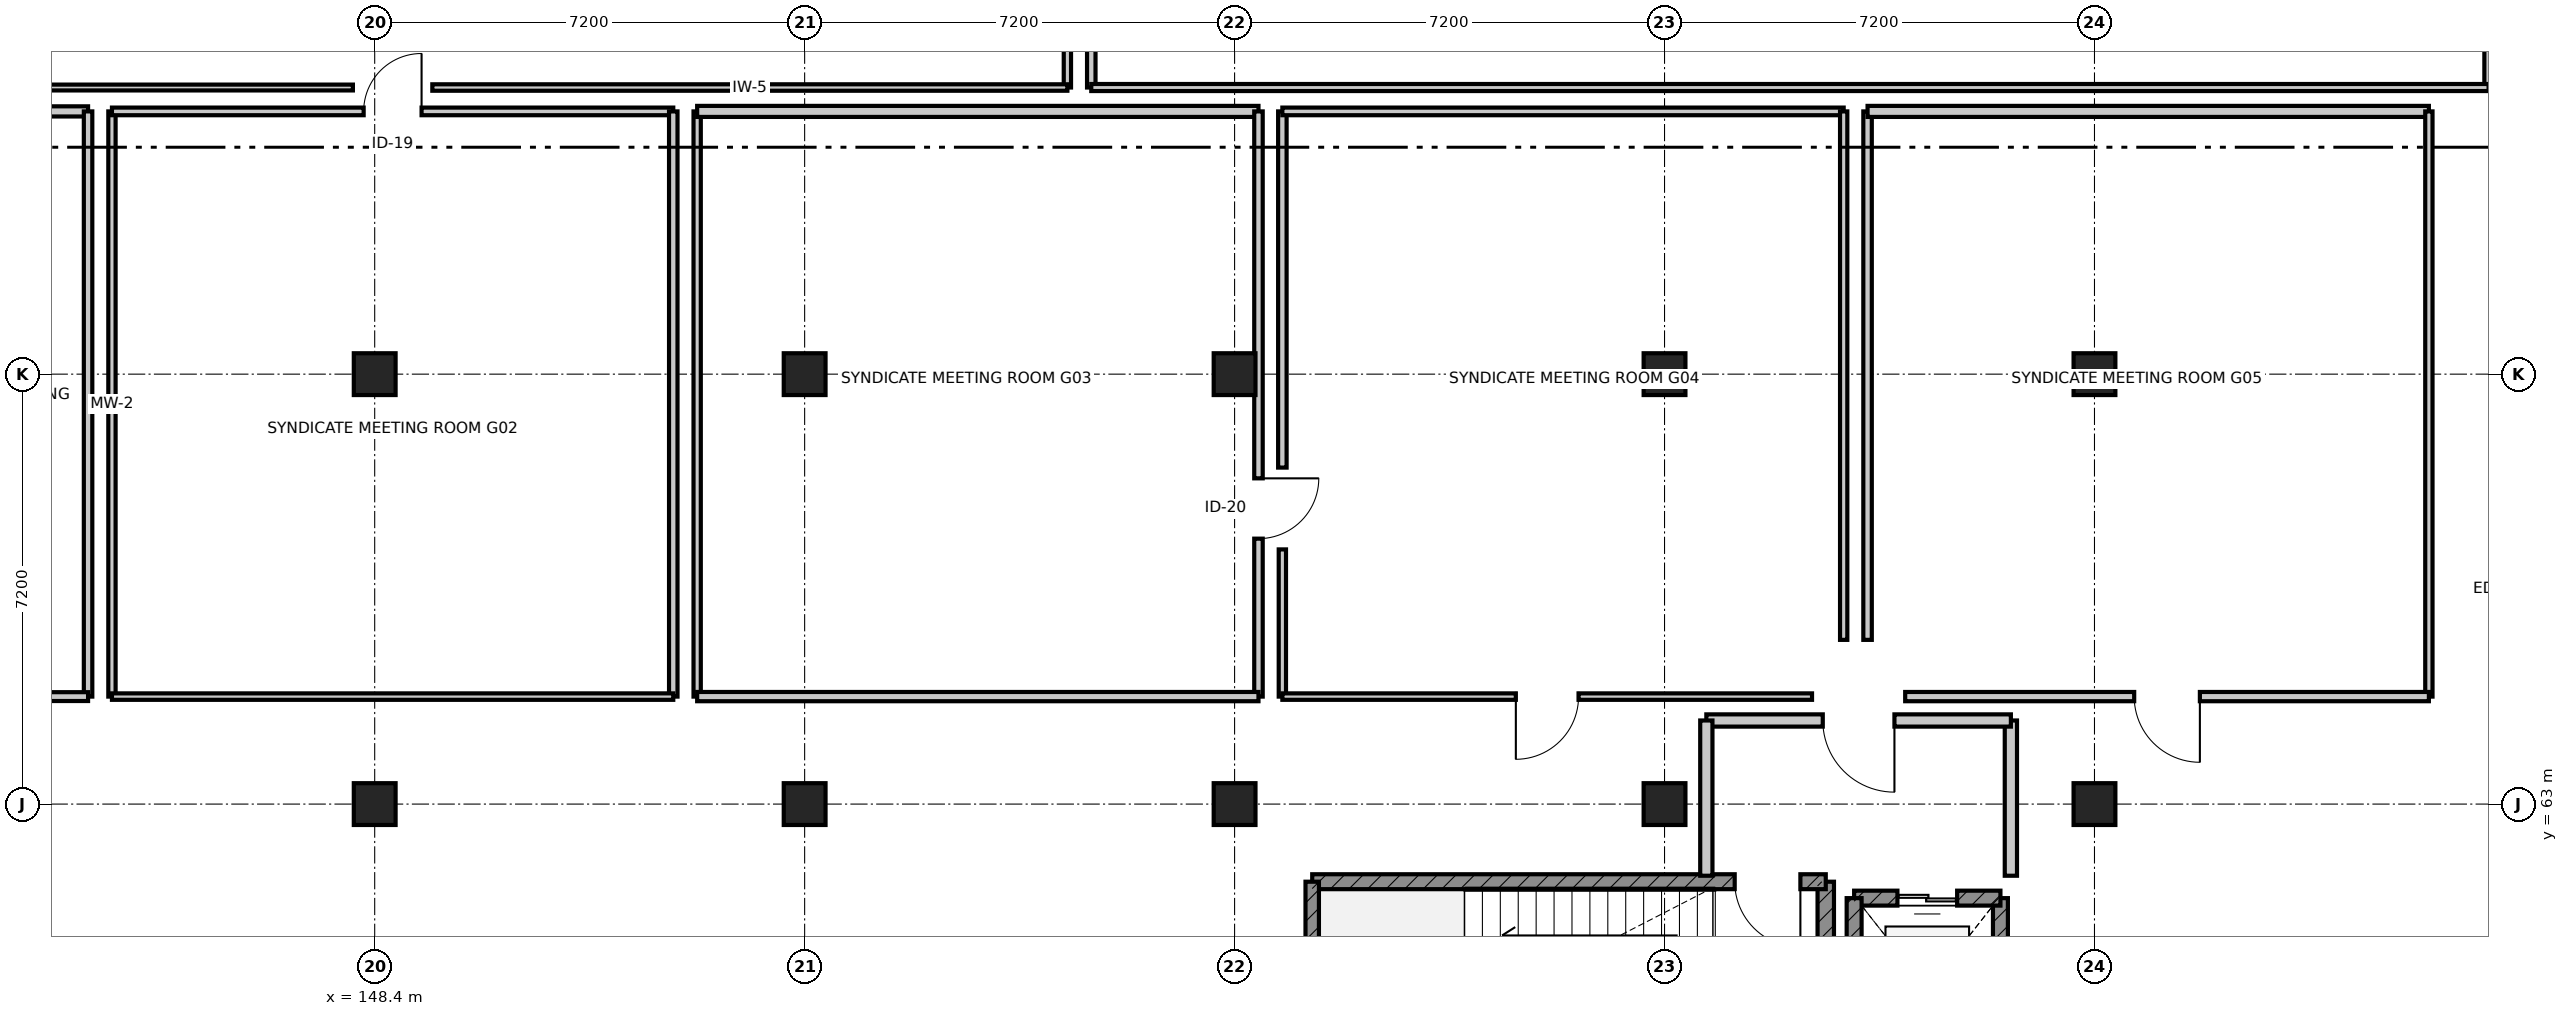
"""IFC4 building model, lengths in metres.
Left out: names, types, materials, properties, quantities, classifications, styles, units other than length and angle.
Written with IfcOpenShell. Run it as: python <this file> out.ifc"""

import sys

from ifc_helpers import new_model, si_unit, direction, frame, frame_2d, origin, origin_2d, place, context, subcontext, project, spatial, rectangle, extrude, element, fill, save


model = new_model("IFC4")
c1 = context("Model", 3, precision=1e-05, world=origin(), true_north=direction((0.0, 1.0)))
c2 = subcontext(c1, "Body", "Model", "MODEL_VIEW")
j1 = project(units=[si_unit("LENGTHUNIT", "METRE"), si_unit("PLANEANGLEUNIT", "RADIAN")], contexts=[c1])
p1 = place(None, origin())
s1 = spatial("IfcSite", under=j1, at=p1, CompositionType="ELEMENT")
p2 = place(p1, origin())
s2 = spatial("IfcBuilding", under=s1, at=p2, CompositionType="ELEMENT")
p3 = place(p2, origin())
s3 = spatial("IfcBuildingStorey", under=s2, at=p3, CompositionType="ELEMENT", Elevation=0.0)
for number, where, z_axis, x_axis in (
    (1, (148.4, 63.0, 0.0), (0.0, 0.0, 1.0), (1.0, 0.0, 0.0)),
    (2, (148.4, 70.2, 0.0), (0.0, 0.0, 1.0), (1.0, 0.0, 0.0)),
    (3, (155.6, 63.0, 0.0), (0.0, 0.0, 1.0), (1.0, 0.0, 0.0)),
    (4, (155.6, 70.2, 0.0), (0.0, 0.0, 1.0), (1.0, 0.0, 0.0)),
    (5, (162.8, 63.0, 0.0), (0.0, 0.0, 1.0), (1.0, 0.0, 0.0)),
    (6, (162.8, 70.2, 0.0), (0.0, 0.0, 1.0), (1.0, 0.0, 0.0)),
    (7, (170.0, 63.0, 0.0), (0.0, 0.0, 1.0), (1.0, 0.0, 0.0)),
    (8, (170.0, 70.2, 0.0), (0.0, 0.0, 1.0), (1.0, 0.0, 0.0)),
    (9, (177.2, 63.0, 0.0), (0.0, 0.0, 1.0), (1.0, 0.0, 0.0)),
    (10, (177.2, 70.2, 0.0), (0.0, 0.0, 1.0), (1.0, 0.0, 0.0)),
):
    element("IfcColumn", number, at=place(p3, frame(where, z_axis=z_axis, x_axis=x_axis)), inside=s3, PredefinedType="COLUMN", context=c2, shape_type="SweptSolid", body=[
        extrude(rectangle(XDim=0.7, YDim=0.7, at=origin_2d()), origin(), (0.0, 0.0, 1.0), 5.4),
    ])
p4 = place(p3, frame((172.7, 58.1, 0.0), z_axis=(0.0, 0.0, 1.0), x_axis=(0.0, 1.0, 0.0)))
e11 = element("IfcWall", 11, at=p4, inside=s3, PredefinedType="SHEAR", context=c2, shape_type="SweptSolid", body=[
    extrude(rectangle(XDim=3.6, YDim=0.275, at=frame_2d((1.8, 0.0))), origin(), (0.0, 0.0, 1.0), 5.1),
])
p5 = place(p3, frame((172.7, 61.7, 0.0), z_axis=(0.0, 0.0, 1.0), x_axis=(-1.0, 0.0, 0.0)))
e12 = element("IfcWall", 12, at=p5, inside=s3, PredefinedType="SHEAR", context=c2, shape_type="SweptSolid", body=[
    extrude(rectangle(XDim=8.6, YDim=0.25, at=frame_2d((4.3, 0.0))), origin(), (0.0, 0.0, 1.0), 5.1),
])
p6 = place(p5, frame((0.425, 0.0, 0.0)))
e13 = element("IfcOpeningElement", 13, at=p6, cuts=e12, PredefinedType="OPENING", context=c2, shape_type="SweptSolid", body=[
    extrude(rectangle(XDim=1.1, YDim=2.1, at=frame_2d((0.55, 1.05))), frame((0.0, 0.135, 0.0), z_axis=(0.0, -1.0, 0.0), x_axis=(1.0, 0.0, 0.0)), (0.0, 0.0, 1.0), 0.27),
])
p7 = place(p3, frame((164.1, 61.7, 0.0), z_axis=(0.0, 0.0, 1.0), x_axis=(0.0, -1.0, 0.0)))
e14 = element("IfcWall", 14, at=p7, inside=s3, PredefinedType="SHEAR", context=c2, shape_type="SweptSolid", body=[
    extrude(rectangle(XDim=3.6, YDim=0.225, at=frame_2d((1.8, 0.0))), origin(), (0.0, 0.0, 1.0), 5.1),
])
p8 = place(p3, frame((175.625, 58.375, 0.0), z_axis=(0.0, 0.0, 1.0), x_axis=(0.0, 1.0, 0.0)))
e15 = element("IfcWall", 15, at=p8, inside=s3, PredefinedType="SHEAR", context=c2, shape_type="SweptSolid", body=[
    extrude(rectangle(XDim=3.05, YDim=0.25, at=frame_2d((1.525, 0.0))), origin(), (0.0, 0.0, 1.0), 5.1),
])
p9 = place(p3, frame((175.625, 61.425, 0.0), z_axis=(0.0, 0.0, 1.0), x_axis=(-1.0, 0.0, 0.0)))
e16 = element("IfcWall", 16, at=p9, inside=s3, PredefinedType="SHEAR", context=c2, shape_type="SweptSolid", body=[
    extrude(rectangle(XDim=2.45, YDim=0.25, at=frame_2d((1.225, 0.0))), origin(), (0.0, 0.0, 1.0), 5.1),
])
p10 = place(p9, frame((0.725, 0.0, 0.0)))
e17 = element("IfcOpeningElement", 17, at=p10, cuts=e16, PredefinedType="OPENING", context=c2, shape_type="SweptSolid", body=[
    extrude(rectangle(XDim=1.0, YDim=2.15, at=frame_2d((0.5, 1.075))), frame((0.0, 0.135, 0.0), z_axis=(0.0, -1.0, 0.0), x_axis=(1.0, 0.0, 0.0)), (0.0, 0.0, 1.0), 0.27),
])
p11 = place(p3, frame((173.175, 61.425, 0.0), z_axis=(0.0, 0.0, 1.0), x_axis=(0.0, -1.0, 0.0)))
e18 = element("IfcWall", 18, at=p11, inside=s3, PredefinedType="SHEAR", context=c2, shape_type="SweptSolid", body=[
    extrude(rectangle(XDim=3.05, YDim=0.25, at=frame_2d((1.525, 0.0))), origin(), (0.0, 0.0, 1.0), 5.1),
])
p12 = place(p3, frame((175.8, 61.8, 0.0), z_axis=(0.0, 0.0, 1.0), x_axis=(0.0, 1.0, 0.0)))
e19 = element("IfcWall", 19, at=p12, inside=s3, PredefinedType="PARTITIONING", context=c2, shape_type="SweptSolid", body=[
    extrude(rectangle(XDim=2.6, YDim=0.205, at=frame_2d((1.3, 0.0))), origin(), (0.0, 0.0, 1.0), 4.435),
])
p13 = place(p3, frame((175.8, 64.4, 0.0), z_axis=(0.0, 0.0, 1.0), x_axis=(-1.0, 0.0, 0.0)))
e20 = element("IfcWall", 20, at=p13, inside=s3, PredefinedType="PARTITIONING", context=c2, shape_type="SweptSolid", body=[
    extrude(rectangle(XDim=5.1, YDim=0.205, at=frame_2d((2.55, 0.0))), origin(), (0.0, 0.0, 1.0), 5.1),
])
p14 = place(p13, frame((1.95, 0.0, 0.0)))
e21 = element("IfcOpeningElement", 21, at=p14, cuts=e20, PredefinedType="OPENING", context=c2, shape_type="SweptSolid", body=[
    extrude(rectangle(XDim=1.2, YDim=2.1, at=frame_2d((0.6, 1.05))), frame((0.0, 0.113, 0.0), z_axis=(0.0, -1.0, 0.0), x_axis=(1.0, 0.0, 0.0)), (0.0, 0.0, 1.0), 0.225),
])
p15 = place(p3, frame((170.7, 64.4, 0.0), z_axis=(0.0, 0.0, 1.0), x_axis=(0.0, -1.0, 0.0)))
e22 = element("IfcWall", 22, at=p15, inside=s3, PredefinedType="PARTITIONING", context=c2, shape_type="SweptSolid", body=[
    extrude(rectangle(XDim=2.6, YDim=0.205, at=frame_2d((1.3, 0.0))), origin(), (0.0, 0.0, 1.0), 4.435),
])
p16 = place(p3, frame((134.2, 74.6, 0.0), z_axis=(0.0, 0.0, 1.0), x_axis=(1.0, 0.0, 0.0)))
e23 = element("IfcWall", 23, at=p16, inside=s3, PredefinedType="PARTITIONING", context=c2, shape_type="SweptSolid", body=[
    extrude(rectangle(XDim=9.4, YDim=0.17, at=frame_2d((4.7, 0.0))), origin(), (0.0, 0.0, 1.0), 4.548),
])
p17 = place(p3, frame((143.6, 74.6, 0.0), z_axis=(0.0, 0.0, 1.0), x_axis=(0.0, -1.0, 0.0)))
e24 = element("IfcWall", 24, at=p17, inside=s3, PredefinedType="MOVABLE", context=c2, shape_type="SweptSolid", body=[
    extrude(rectangle(XDim=9.8, YDim=0.142, at=frame_2d((4.9, 0.0))), origin(), (0.0, 0.0, 1.0), 4.435),
])
p18 = place(p3, frame((143.6, 64.8, 0.0), z_axis=(0.0, 0.0, 1.0), x_axis=(-1.0, 0.0, 0.0)))
e25 = element("IfcWall", 25, at=p18, inside=s3, PredefinedType="PARTITIONING", context=c2, shape_type="SweptSolid", body=[
    extrude(rectangle(XDim=9.4, YDim=0.148, at=frame_2d((4.7, 0.0))), origin(), (0.0, 0.0, 1.0), 4.548),
])
p19 = place(p3, frame((144.0, 64.8, 0.0), z_axis=(0.0, 0.0, 1.0), x_axis=(0.0, 1.0, 0.0)))
e26 = element("IfcWall", 26, at=p19, inside=s3, PredefinedType="MOVABLE", context=c2, shape_type="SweptSolid", body=[
    extrude(rectangle(XDim=9.8, YDim=0.122, at=frame_2d((4.9, 0.0))), origin(), (0.0, 0.0, 1.0), 4.435),
])
p20 = place(p3, frame((144.0, 74.6, 0.0), z_axis=(0.0, 0.0, 1.0), x_axis=(1.0, 0.0, 0.0)))
e27 = element("IfcWall", 27, at=p20, inside=s3, PredefinedType="PARTITIONING", context=c2, shape_type="SweptSolid", body=[
    extrude(rectangle(XDim=9.4, YDim=0.128, at=frame_2d((4.7, 0.0))), origin(), (0.0, 0.0, 1.0), 4.548),
])
p21 = place(p20, frame((4.215, 0.0, 0.0)))
e28 = element("IfcOpeningElement", 28, at=p21, cuts=e27, PredefinedType="OPENING", context=c2, shape_type="SweptSolid", body=[
    extrude(rectangle(XDim=0.97, YDim=2.16, at=frame_2d((0.485, 1.08))), frame((0.0, 0.074, 0.0), z_axis=(0.0, -1.0, 0.0), x_axis=(1.0, 0.0, 0.0)), (0.0, 0.0, 1.0), 0.148),
])
p22 = place(p3, frame((153.4, 74.6, 0.0), z_axis=(0.0, 0.0, 1.0), x_axis=(0.0, -1.0, 0.0)))
e29 = element("IfcWall", 29, at=p22, inside=s3, PredefinedType="MOVABLE", context=c2, shape_type="SweptSolid", body=[
    extrude(rectangle(XDim=9.8, YDim=0.142, at=frame_2d((4.9, 0.0))), origin(), (0.0, 0.0, 1.0), 4.435),
])
p23 = place(p3, frame((153.4, 64.8, 0.0), z_axis=(0.0, 0.0, 1.0), x_axis=(-1.0, 0.0, 0.0)))
e30 = element("IfcWall", 30, at=p23, inside=s3, PredefinedType="PARTITIONING", context=c2, shape_type="SweptSolid", body=[
    extrude(rectangle(XDim=9.4, YDim=0.108, at=frame_2d((4.7, 0.0))), origin(), (0.0, 0.0, 1.0), 4.548),
])
p24 = place(p3, frame((153.8, 64.8, 0.0), z_axis=(0.0, 0.0, 1.0), x_axis=(0.0, 1.0, 0.0)))
e31 = element("IfcWall", 31, at=p24, inside=s3, PredefinedType="MOVABLE", context=c2, shape_type="SweptSolid", body=[
    extrude(rectangle(XDim=9.8, YDim=0.122, at=frame_2d((4.9, 0.0))), origin(), (0.0, 0.0, 1.0), 4.435),
])
p25 = place(p3, frame((153.8, 74.6, 0.0), z_axis=(0.0, 0.0, 1.0), x_axis=(1.0, 0.0, 0.0)))
e32 = element("IfcWall", 32, at=p25, inside=s3, PredefinedType="PARTITIONING", context=c2, shape_type="SweptSolid", body=[
    extrude(rectangle(XDim=9.4, YDim=0.185, at=frame_2d((4.7, 0.0))), origin(), (0.0, 0.0, 1.0), 4.548),
])
p26 = place(p3, frame((163.2, 74.6, 0.0), z_axis=(0.0, 0.0, 1.0), x_axis=(0.0, -1.0, 0.0)))
e33 = element("IfcWall", 33, at=p26, inside=s3, PredefinedType="MOVABLE", context=c2, shape_type="SweptSolid", body=[
    extrude(rectangle(XDim=9.8, YDim=0.142, at=frame_2d((4.9, 0.0))), origin(), (0.0, 0.0, 1.0), 4.435),
])
p27 = place(p26, frame((6.145, 0.0, 0.0)))
e34 = element("IfcOpeningElement", 34, at=p27, cuts=e33, PredefinedType="OPENING", context=c2, shape_type="SweptSolid", body=[
    extrude(rectangle(XDim=1.01, YDim=2.16, at=frame_2d((0.505, 1.08))), frame((0.0, 0.081, 0.0), z_axis=(0.0, -1.0, 0.0), x_axis=(1.0, 0.0, 0.0)), (0.0, 0.0, 1.0), 0.162),
])
p28 = place(p3, frame((163.2, 64.8, 0.0), z_axis=(0.0, 0.0, 1.0), x_axis=(-1.0, 0.0, 0.0)))
e35 = element("IfcWall", 35, at=p28, inside=s3, PredefinedType="PARTITIONING", context=c2, shape_type="SweptSolid", body=[
    extrude(rectangle(XDim=9.4, YDim=0.155, at=frame_2d((4.7, 0.0))), origin(), (0.0, 0.0, 1.0), 4.548),
])
p29 = place(p3, frame((163.6, 64.8, 0.0), z_axis=(0.0, 0.0, 1.0), x_axis=(0.0, 1.0, 0.0)))
e36 = element("IfcWall", 36, at=p29, inside=s3, PredefinedType="MOVABLE", context=c2, shape_type="SweptSolid", body=[
    extrude(rectangle(XDim=2.465, YDim=0.122, at=frame_2d((1.232, 0.0))), origin(), (0.0, 0.0, 1.0), 4.727),
])
p30 = place(p3, frame((163.6, 68.635, 0.0), z_axis=(0.0, 0.0, 1.0), x_axis=(0.0, 1.0, 0.0)))
e37 = element("IfcWall", 37, at=p30, inside=s3, PredefinedType="MOVABLE", context=c2, shape_type="SweptSolid", body=[
    extrude(rectangle(XDim=5.965, YDim=0.142, at=frame_2d((2.982, 0.0))), origin(), (0.0, 0.0, 1.0), 4.435),
])
p31 = place(p3, frame((163.6, 74.6, 0.0), z_axis=(0.0, 0.0, 1.0), x_axis=(1.0, 0.0, 0.0)))
e38 = element("IfcWall", 38, at=p31, inside=s3, PredefinedType="PARTITIONING", context=c2, shape_type="SweptSolid", body=[
    extrude(rectangle(XDim=9.4, YDim=0.128, at=frame_2d((4.7, 0.0))), origin(), (0.0, 0.0, 1.0), 4.548),
])
p32 = place(p3, frame((173.0, 74.6, 0.0), z_axis=(0.0, 0.0, 1.0), x_axis=(0.0, -1.0, 0.0)))
e39 = element("IfcWall", 39, at=p32, inside=s3, PredefinedType="MOVABLE", context=c2, shape_type="SweptSolid", body=[
    extrude(rectangle(XDim=8.85, YDim=0.122, at=frame_2d((4.425, 0.0))), origin(), (0.0, 0.0, 1.0), 4.435),
])
p33 = place(p3, frame((172.47, 64.8, 0.0), z_axis=(0.0, 0.0, 1.0), x_axis=(-1.0, 0.0, 0.0)))
e40 = element("IfcWall", 40, at=p33, inside=s3, PredefinedType="PARTITIONING", context=c2, shape_type="SweptSolid", body=[
    extrude(rectangle(XDim=8.87, YDim=0.108, at=frame_2d((4.435, 0.0))), origin(), (0.0, 0.0, 1.0), 4.548),
])
p34 = place(p33, frame((3.91, 0.0, 0.0)))
e41 = element("IfcOpeningElement", 41, at=p34, cuts=e40, PredefinedType="OPENING", context=c2, shape_type="SweptSolid", body=[
    extrude(rectangle(XDim=1.05, YDim=2.18, at=frame_2d((0.525, 1.09))), frame((0.0, 0.064, 0.0), z_axis=(0.0, -1.0, 0.0), x_axis=(1.0, 0.0, 0.0)), (0.0, 0.0, 1.0), 0.128),
])
p35 = place(p3, frame((173.4, 65.75, 0.0), z_axis=(0.0, 0.0, 1.0), x_axis=(0.0, 1.0, 0.0)))
e42 = element("IfcWall", 42, at=p35, inside=s3, PredefinedType="MOVABLE", context=c2, shape_type="SweptSolid", body=[
    extrude(rectangle(XDim=8.85, YDim=0.142, at=frame_2d((4.425, 0.0))), origin(), (0.0, 0.0, 1.0), 4.435),
])
p36 = place(p3, frame((173.4, 74.6, 0.0), z_axis=(0.0, 0.0, 1.0), x_axis=(1.0, 0.0, 0.0)))
e43 = element("IfcWall", 43, at=p36, inside=s3, PredefinedType="PARTITIONING", context=c2, shape_type="SweptSolid", body=[
    extrude(rectangle(XDim=9.4, YDim=0.185, at=frame_2d((4.7, 0.0))), origin(), (0.0, 0.0, 1.0), 4.548),
])
p37 = place(p3, frame((182.8, 74.6, 0.0), z_axis=(0.0, 0.0, 1.0), x_axis=(0.0, -1.0, 0.0)))
e44 = element("IfcWall", 44, at=p37, inside=s3, PredefinedType="MOVABLE", context=c2, shape_type="SweptSolid", body=[
    extrude(rectangle(XDim=9.8, YDim=0.122, at=frame_2d((4.9, 0.0))), origin(), (0.0, 0.0, 1.0), 4.435),
])
p38 = place(p3, frame((182.8, 64.8, 0.0), z_axis=(0.0, 0.0, 1.0), x_axis=(-1.0, 0.0, 0.0)))
e45 = element("IfcWall", 45, at=p38, inside=s3, PredefinedType="PARTITIONING", context=c2, shape_type="SweptSolid", body=[
    extrude(rectangle(XDim=8.77, YDim=0.155, at=frame_2d((4.385, 0.0))), origin(), (0.0, 0.0, 1.0), 4.548),
])
p39 = place(p38, frame((3.835, 0.0, 0.0)))
e46 = element("IfcOpeningElement", 46, at=p39, cuts=e45, PredefinedType="OPENING", context=c2, shape_type="SweptSolid", body=[
    extrude(rectangle(XDim=1.1, YDim=2.18, at=frame_2d((0.55, 1.09))), frame((0.0, 0.087, 0.0), z_axis=(0.0, -1.0, 0.0), x_axis=(1.0, 0.0, 0.0)), (0.0, 0.0, 1.0), 0.175),
])
p40 = place(p3, frame((160.0, 86.6, 0.0), z_axis=(0.0, 0.0, 1.0), x_axis=(0.0, -1.0, 0.0)))
e47 = element("IfcWall", 47, at=p40, inside=s3, PredefinedType="MOVABLE", context=c2, shape_type="SweptSolid", body=[
    extrude(rectangle(XDim=11.6, YDim=0.122, at=frame_2d((5.8, 0.0))), origin(), (0.0, 0.0, 1.0), 4.435),
])
p41 = place(p3, frame((160.0, 75.0, 0.0), z_axis=(0.0, 0.0, 1.0), x_axis=(-1.0, 0.0, 0.0)))
e48 = element("IfcWall", 48, at=p41, inside=s3, PredefinedType="PARTITIONING", context=c2, shape_type="SweptSolid", body=[
    extrude(rectangle(XDim=10.635, YDim=0.108, at=frame_2d((5.317, 0.0))), origin(), (0.0, 0.0, 1.0), 4.548),
])
p42 = place(p3, frame((148.035, 75.0, 0.0), z_axis=(0.0, 0.0, 1.0), x_axis=(-1.0, 0.0, 0.0)))
e49 = element("IfcWall", 49, at=p42, inside=s3, PredefinedType="PARTITIONING", context=c2, shape_type="SweptSolid", body=[
    extrude(rectangle(XDim=13.835, YDim=0.098, at=frame_2d((6.917, 0.0))), origin(), (0.0, 0.0, 1.0), 4.548),
])
p43 = place(p3, frame((160.4, 75.0, 0.0), z_axis=(0.0, 0.0, 1.0), x_axis=(0.0, 1.0, 0.0)))
e50 = element("IfcWall", 50, at=p43, inside=s3, PredefinedType="MOVABLE", context=c2, shape_type="SweptSolid", body=[
    extrude(rectangle(XDim=16.2, YDim=0.142, at=frame_2d((8.1, 0.0))), origin(), (0.0, 0.0, 1.0), 4.435),
])
p44 = place(p43, frame((11.74, 0.0, 0.0)))
e51 = element("IfcOpeningElement", 51, at=p44, cuts=e50, PredefinedType="OPENING", context=c2, shape_type="SweptSolid", body=[
    extrude(rectangle(XDim=1.22, YDim=2.24, at=frame_2d((0.61, 1.12))), frame((0.0, 0.081, 0.0), z_axis=(0.0, -1.0, 0.0), x_axis=(1.0, 0.0, 0.0)), (0.0, 0.0, 1.0), 0.162),
])
p45 = place(p3, frame((183.8, 79.82, 0.0), z_axis=(0.0, 0.0, 1.0), x_axis=(0.0, -1.0, 0.0)))
e52 = element("IfcWall", 52, at=p45, inside=s3, PredefinedType="MOVABLE", context=c2, shape_type="SweptSolid", body=[
    extrude(rectangle(XDim=4.82, YDim=0.142, at=frame_2d((2.41, 0.0))), origin(), (0.0, 0.0, 1.0), 4.435),
])
p46 = place(p3, frame((183.8, 75.0, 0.0), z_axis=(0.0, 0.0, 1.0), x_axis=(-1.0, 0.0, 0.0)))
e53 = element("IfcWall", 53, at=p46, inside=s3, PredefinedType="PARTITIONING", context=c2, shape_type="SweptSolid", body=[
    extrude(rectangle(XDim=23.4, YDim=0.118, at=frame_2d((11.7, 0.0))), origin(), (0.0, 0.0, 1.0), 4.548),
])
p47 = place(p6, origin())
e54 = element("IfcDoor", 54, at=p47, inside=s3, OperationType="SINGLE_SWING_LEFT", PredefinedType="DOOR", context=c2, shape_type="SweptSolid", body=[
    extrude(rectangle(XDim=1.1, YDim=2.1, at=frame_2d((0.55, 1.05))), frame((0.0, 0.025, 0.0), z_axis=(0.0, -1.0, 0.0), x_axis=(1.0, 0.0, 0.0)), (0.0, 0.0, 1.0), 0.05),
])
fill(e13, e54)
p48 = place(p10, origin())
e55 = element("IfcDoor", 55, at=p48, inside=s3, OperationType="DOUBLE_DOOR_SLIDING", PredefinedType="DOOR", context=c2, shape_type="SweptSolid", body=[
    extrude(rectangle(XDim=1.0, YDim=2.15, at=frame_2d((0.5, 1.075))), frame((0.0, 0.025, 0.0), z_axis=(0.0, -1.0, 0.0), x_axis=(1.0, 0.0, 0.0)), (0.0, 0.0, 1.0), 0.05),
])
fill(e17, e55)
p49 = place(p14, origin())
e56 = element("IfcDoor", 56, at=p49, inside=s3, OperationType="SINGLE_SWING_LEFT", PredefinedType="DOOR", context=c2, shape_type="SweptSolid", body=[
    extrude(rectangle(XDim=1.2, YDim=2.1, at=frame_2d((0.6, 1.05))), frame((0.0, 0.025, 0.0), z_axis=(0.0, -1.0, 0.0), x_axis=(1.0, 0.0, 0.0)), (0.0, 0.0, 1.0), 0.05),
])
fill(e21, e56)
p50 = place(p21, origin())
e57 = element("IfcDoor", 57, at=p50, inside=s3, OperationType="SINGLE_SWING_RIGHT", PredefinedType="DOOR", context=c2, shape_type="SweptSolid", body=[
    extrude(rectangle(XDim=0.97, YDim=2.16, at=frame_2d((0.485, 1.08))), frame((0.0, 0.025, 0.0), z_axis=(0.0, -1.0, 0.0), x_axis=(1.0, 0.0, 0.0)), (0.0, 0.0, 1.0), 0.05),
])
fill(e28, e57)
p51 = place(p27, origin())
e58 = element("IfcDoor", 58, at=p51, inside=s3, OperationType="SINGLE_SWING_LEFT", PredefinedType="DOOR", context=c2, shape_type="SweptSolid", body=[
    extrude(rectangle(XDim=1.01, YDim=2.16, at=frame_2d((0.505, 1.08))), frame((0.0, 0.025, 0.0), z_axis=(0.0, -1.0, 0.0), x_axis=(1.0, 0.0, 0.0)), (0.0, 0.0, 1.0), 0.05),
])
fill(e34, e58)
p52 = place(p34, origin())
e59 = element("IfcDoor", 59, at=p52, inside=s3, OperationType="SINGLE_SWING_RIGHT", PredefinedType="DOOR", context=c2, shape_type="SweptSolid", body=[
    extrude(rectangle(XDim=1.05, YDim=2.18, at=frame_2d((0.525, 1.09))), frame((0.0, 0.025, 0.0), z_axis=(0.0, -1.0, 0.0), x_axis=(1.0, 0.0, 0.0)), (0.0, 0.0, 1.0), 0.05),
])
fill(e41, e59)
p53 = place(p39, origin())
e60 = element("IfcDoor", 60, at=p53, inside=s3, OperationType="SINGLE_SWING_LEFT", PredefinedType="DOOR", context=c2, shape_type="SweptSolid", body=[
    extrude(rectangle(XDim=1.1, YDim=2.18, at=frame_2d((0.55, 1.09))), frame((0.0, 0.025, 0.0), z_axis=(0.0, -1.0, 0.0), x_axis=(1.0, 0.0, 0.0)), (0.0, 0.0, 1.0), 0.05),
])
fill(e46, e60)
save(model, sys.argv[1])
